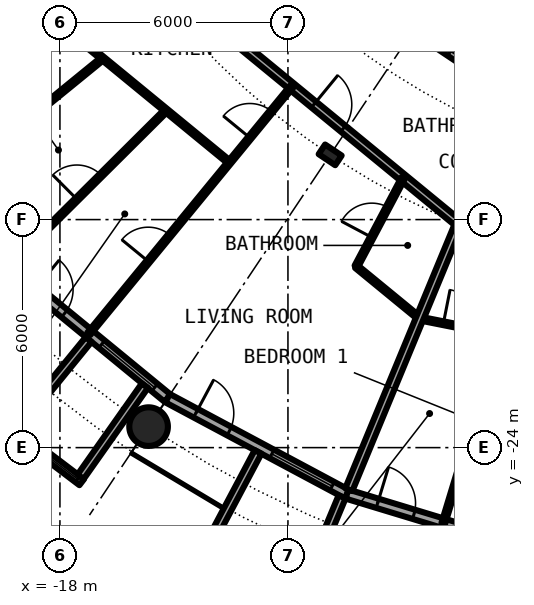
"""IFC4 building model, lengths in metres.
Left out: names, types, materials, properties, quantities, classifications, styles, units other than length and angle.
Written with IfcOpenShell. Run it as: python <this file> out.ifc"""

import sys

from ifc_helpers import new_model, si_unit, direction, frame, frame_2d, origin, origin_2d, place, context, subcontext, project, spatial, rectangle, circle, hollow_circle, i_section, extrude, element, fill, save


model = new_model("IFC4")
c1 = context("Model", 3, precision=1e-05, world=origin(), true_north=direction((0.0, 1.0)))
c2 = subcontext(c1, "Body", "Model", "MODEL_VIEW")
j1 = project(units=[si_unit("LENGTHUNIT", "METRE"), si_unit("PLANEANGLEUNIT", "RADIAN")], contexts=[c1])
p1 = place(None, origin())
s1 = spatial("IfcSite", under=j1, at=p1, CompositionType="ELEMENT")
p2 = place(p1, origin())
s2 = spatial("IfcBuilding", under=s1, at=p2, CompositionType="ELEMENT")
p3 = place(p2, frame((0.0, 0.0, 88.0)))
s3 = spatial("IfcBuildingStorey", under=s2, at=p3, CompositionType="ELEMENT", Elevation=88.0)
p4 = place(p3, frame((-15.667, -23.448, 0.0), z_axis=(0.0, 0.0, 1.0), x_axis=(1.0, 0.0, 0.0)))
e1 = element("IfcColumn", 1, at=p4, inside=s3, PredefinedType="COLUMN", context=c2, shape_type="SweptSolid", body=[
    extrude(hollow_circle(Radius=0.508, WallThickness=0.04, at=origin_2d()), origin(), (0.0, 0.0, 1.0), 3.05),
])
p5 = place(p3, frame((-10.889, -16.297, 0.0), z_axis=(0.0, 0.0, 1.0), x_axis=(-0.55557023302, -0.831469612303, 0.0)))
e2 = element("IfcColumn", 2, at=p5, inside=s3, PredefinedType="COLUMN", context=c2, shape_type="SweptSolid", body=[
    extrude(i_section(OverallWidth=0.306, OverallDepth=0.524, WebThickness=0.021, FlangeThickness=0.04, FilletRadius=0.027, at=origin_2d()), origin(), (0.0, 0.0, 1.0), 3.05),
])
p6 = place(p3, frame((-19.304, -19.304, 0.0), z_axis=(0.0, 0.0, 1.0), x_axis=(0.773019449054, -0.634382322723, 0.0)))
e3 = element("IfcWall", 3, at=p6, inside=s3, PredefinedType="SOLIDWALL", context=c2, shape_type="SweptSolid", body=[
    extrude(rectangle(XDim=5.352, YDim=0.25, at=frame_2d((2.676, 0.0))), origin(), (0.0, 0.0, 1.0), 2.7),
])
p7 = place(p6, frame((0.841, 0.0, 0.0)))
e4 = element("IfcOpeningElement", 4, at=p7, cuts=e3, PredefinedType="OPENING", context=c2, shape_type="SweptSolid", body=[
    extrude(rectangle(XDim=1.0, YDim=2.2, at=frame_2d((0.5, 1.1))), frame((0.0, 0.135, 0.0), z_axis=(0.0, -1.0, 0.0), x_axis=(1.0, 0.0, 0.0)), (0.0, 0.0, 1.0), 0.27),
])
p8 = place(p6, frame((3.111, 0.0, 0.3)))
e5 = element("IfcOpeningElement", 5, at=p8, cuts=e3, PredefinedType="OPENING", context=c2, shape_type="SweptSolid", body=[
    extrude(rectangle(XDim=1.8, YDim=2.1, at=frame_2d((0.9, 1.05))), frame((0.0, 0.135, 0.0), z_axis=(0.0, -1.0, 0.0), x_axis=(1.0, 0.0, 0.0)), (0.0, 0.0, 1.0), 0.27),
])
p9 = place(p3, frame((-19.289, -23.497, -0.03), z_axis=(0.0, 0.0, 1.0), x_axis=(0.796842165306, -0.60418752353, 0.0)))
e6 = element("IfcWall", 6, at=p9, inside=s3, PredefinedType="SOLIDWALL", context=c2, shape_type="SweptSolid", body=[
    extrude(rectangle(XDim=2.337, YDim=0.2, at=frame_2d((1.168, 0.0))), origin(), (0.0, 0.0, 1.0), 2.73),
])
p10 = place(p9, frame((0.128, 0.0, 0.33)))
e7 = element("IfcOpeningElement", 7, at=p10, cuts=e6, PredefinedType="OPENING", context=c2, shape_type="SweptSolid", body=[
    extrude(circle(Radius=1.04, at=frame_2d((1.04, 1.04))), frame((0.0, 0.11, 0.0), z_axis=(0.0, -1.0, 0.0), x_axis=(1.0, 0.0, 0.0)), (0.0, 0.0, 1.0), 0.22),
])
p11 = place(p3, frame((-17.246, -21.155, -0.03), z_axis=(0.0, 0.0, 1.0), x_axis=(-0.631741648902, -0.775179004516, 0.0)))
e8 = element("IfcWall", 8, at=p11, inside=s3, PredefinedType="SOLIDWALL", context=c2, shape_type="SweptSolid", body=[
    extrude(rectangle(XDim=3.006, YDim=0.2, at=frame_2d((1.503, 0.0))), origin(), (0.0, 0.0, 1.0), 2.73),
])
p12 = place(p3, frame((-15.765, -22.37, -0.03), z_axis=(0.0, 0.0, 1.0), x_axis=(-0.576274612209, -0.817256123454, 0.0)))
e9 = element("IfcWall", 9, at=p12, inside=s3, PredefinedType="SOLIDWALL", context=c2, shape_type="SweptSolid", body=[
    extrude(rectangle(XDim=2.933, YDim=0.2, at=frame_2d((1.466, 0.0))), origin(), (0.0, 0.0, 1.0), 2.73),
])
p13 = place(p3, frame((-15.167, -22.699, 0.0), z_axis=(0.0, 0.0, 1.0), x_axis=(0.881915646801, -0.471407246368, 0.0)))
e10 = element("IfcWall", 10, at=p13, inside=s3, PredefinedType="SOLIDWALL", context=c2, shape_type="SweptSolid", body=[
    extrude(rectangle(XDim=5.352, YDim=0.25, at=frame_2d((2.676, 0.0))), origin(), (0.0, 0.0, 1.0), 2.7),
])
p14 = place(p13, frame((0.841, 0.0, 0.0)))
e11 = element("IfcOpeningElement", 11, at=p14, cuts=e10, PredefinedType="OPENING", context=c2, shape_type="SweptSolid", body=[
    extrude(rectangle(XDim=1.0, YDim=2.2, at=frame_2d((0.5, 1.1))), frame((0.0, 0.135, 0.0), z_axis=(0.0, -1.0, 0.0), x_axis=(1.0, 0.0, 0.0)), (0.0, 0.0, 1.0), 0.27),
])
p15 = place(p13, frame((3.111, 0.0, 0.3)))
e12 = element("IfcOpeningElement", 12, at=p15, cuts=e10, PredefinedType="OPENING", context=c2, shape_type="SweptSolid", body=[
    extrude(rectangle(XDim=1.8, YDim=2.1, at=frame_2d((0.9, 1.05))), frame((0.0, 0.135, 0.0), z_axis=(0.0, -1.0, 0.0), x_axis=(1.0, 0.0, 0.0)), (0.0, 0.0, 1.0), 0.27),
])
p16 = place(p3, frame((-12.787, -24.113, -0.03), z_axis=(0.0, 0.0, 1.0), x_axis=(-0.468365282436, -0.883534924159, 0.0)))
e13 = element("IfcWall", 13, at=p16, inside=s3, PredefinedType="SOLIDWALL", context=c2, shape_type="SweptSolid", body=[
    extrude(rectangle(XDim=3.006, YDim=0.2, at=frame_2d((1.503, 0.0))), origin(), (0.0, 0.0, 1.0), 2.73),
])
p17 = place(p3, frame((-10.575, -25.295, -0.03), z_axis=(0.0, 0.0, 1.0), x_axis=(-0.385697364644, -0.922625353492, 0.0)))
e14 = element("IfcWall", 14, at=p17, inside=s3, PredefinedType="SOLIDWALL", context=c2, shape_type="SweptSolid", body=[
    extrude(rectangle(XDim=2.883, YDim=0.2, at=frame_2d((1.442, 0.0))), origin(), (0.0, 0.0, 1.0), 2.73),
])
p18 = place(p3, frame((-10.447, -25.222, 0.0), z_axis=(0.0, 0.0, 1.0), x_axis=(0.956965678721, -0.290201119486, 0.0)))
e15 = element("IfcWall", 15, at=p18, inside=s3, PredefinedType="SOLIDWALL", context=c2, shape_type="SweptSolid", body=[
    extrude(rectangle(XDim=5.351, YDim=0.25, at=frame_2d((2.676, 0.0))), origin(), (0.0, 0.0, 1.0), 2.7),
])
p19 = place(p18, frame((0.841, 0.0, 0.0)))
e16 = element("IfcOpeningElement", 16, at=p19, cuts=e15, PredefinedType="OPENING", context=c2, shape_type="SweptSolid", body=[
    extrude(rectangle(XDim=1.0, YDim=2.2, at=frame_2d((0.5, 1.1))), frame((0.0, 0.135, 0.0), z_axis=(0.0, -1.0, 0.0), x_axis=(1.0, 0.0, 0.0)), (0.0, 0.0, 1.0), 0.27),
])
p20 = place(p18, frame((3.111, 0.0, 0.3)))
e17 = element("IfcOpeningElement", 17, at=p20, cuts=e15, PredefinedType="OPENING", context=c2, shape_type="SweptSolid", body=[
    extrude(rectangle(XDim=1.8, YDim=2.1, at=frame_2d((0.9, 1.05))), frame((0.0, 0.135, 0.0), z_axis=(0.0, -1.0, 0.0), x_axis=(1.0, 0.0, 0.0)), (0.0, 0.0, 1.0), 0.27),
])
p21 = place(p3, frame((-8.536, -20.603, 0.0), z_axis=(0.0, 0.0, 1.0), x_axis=(0.980795826794, -0.195037294239, 0.0)))
e18 = element("IfcWall", 18, at=p21, inside=s3, PredefinedType="PARTITIONING", context=c2, shape_type="SweptSolid", body=[
    extrude(rectangle(XDim=4.352, YDim=0.1, at=frame_2d((2.176, 0.0))), origin(), (0.0, 0.0, 1.0), 2.7),
])
p22 = place(p21, frame((0.639, 0.0, 0.0)))
e19 = element("IfcOpeningElement", 19, at=p22, cuts=e18, PredefinedType="OPENING", context=c2, shape_type="SweptSolid", body=[
    extrude(rectangle(XDim=0.9, YDim=2.3, at=frame_2d((0.45, 1.15))), frame((0.0, 0.06, 0.0), z_axis=(0.0, -1.0, 0.0), x_axis=(1.0, 0.0, 0.0)), (0.0, 0.0, 1.0), 0.12),
])
p23 = place(p3, frame((-18.542, -12.389, 0.0), z_axis=(0.0, 0.0, 1.0), x_axis=(0.77296666644, -0.634446634929, 0.0)))
e20 = element("IfcWall", 20, at=p23, inside=s3, PredefinedType="PARTITIONING", context=c2, shape_type="SweptSolid", body=[
    extrude(rectangle(XDim=6.474, YDim=0.1, at=frame_2d((3.237, 0.0))), origin(), (0.0, 0.0, 1.0), 2.7),
])
p24 = place(p3, frame((-10.202, -19.234, 0.0), z_axis=(0.0, 0.0, 1.0), x_axis=(0.772948171844, -0.634469166818, 0.0)))
e21 = element("IfcWall", 21, at=p24, inside=s3, PredefinedType="PARTITIONING", context=c2, shape_type="SweptSolid", body=[
    extrude(rectangle(XDim=2.158, YDim=0.1, at=frame_2d((1.079, 0.0))), origin(), (0.0, 0.0, 1.0), 2.7),
])
p25 = place(p3, frame((-16.173, -10.991, 0.0), z_axis=(0.0, 0.0, 1.0), x_axis=(0.773013989296, -0.634388975591, 0.0)))
e22 = element("IfcWall", 22, at=p25, inside=s3, PredefinedType="PARTITIONING", context=c2, shape_type="SweptSolid", body=[
    extrude(rectangle(XDim=11.219, YDim=0.2, at=frame_2d((5.609, 0.0))), origin(), (0.0, 0.0, 1.0), 2.38),
])
p26 = place(p25, frame((6.278, 0.0, 0.0)))
e23 = element("IfcOpeningElement", 23, at=p26, cuts=e22, PredefinedType="OPENING", context=c2, shape_type="SweptSolid", body=[
    extrude(rectangle(XDim=1.0, YDim=2.3, at=frame_2d((0.5, 1.15))), frame((0.0, 0.11, 0.0), z_axis=(0.0, -1.0, 0.0), x_axis=(1.0, 0.0, 0.0)), (0.0, 0.0, 1.0), 0.22),
])
p27 = place(p3, frame((-12.706, -10.291, 0.0), z_axis=(0.0, 0.0, 1.0), x_axis=(0.831588572532, -0.555392155178, 0.0)))
e24 = element("IfcWall", 24, at=p27, inside=s3, PredefinedType="PARTITIONING", context=c2, shape_type="SweptSolid", body=[
    extrude(rectangle(XDim=11.314, YDim=0.2, at=frame_2d((5.657, 0.0))), origin(), (0.0, 0.0, 1.0), 2.7),
])
p28 = place(p27, frame((5.966, 0.0, 0.0)))
e25 = element("IfcOpeningElement", 25, at=p28, cuts=e24, PredefinedType="OPENING", context=c2, shape_type="SweptSolid", body=[
    extrude(rectangle(XDim=1.0, YDim=2.3, at=frame_2d((0.5, 1.15))), frame((0.0, 0.11, 0.0), z_axis=(0.0, -1.0, 0.0), x_axis=(1.0, 0.0, 0.0)), (0.0, 0.0, 1.0), 0.22),
])
p29 = place(p3, frame((-22.595, -15.097, 0.0), z_axis=(0.0, 0.0, 1.0), x_axis=(0.831505405283, 0.555516661303, 0.0)))
e26 = element("IfcWall", 26, at=p29, inside=s3, PredefinedType="PARTITIONING", context=c2, shape_type="SweptSolid", body=[
    extrude(rectangle(XDim=7.312, YDim=0.2, at=frame_2d((3.656, 0.0))), origin(), (0.0, 0.0, 1.0), 2.7),
])
p30 = place(p3, frame((-21.061, -17.173, 0.0), z_axis=(0.0, 0.0, 1.0), x_axis=(0.774926754572, 0.632051046236, 0.0)))
e27 = element("IfcWall", 27, at=p30, inside=s3, PredefinedType="PARTITIONING", context=c2, shape_type="SweptSolid", body=[
    extrude(rectangle(XDim=5.403, YDim=0.1, at=frame_2d((2.702, 0.0))), origin(), (0.0, 0.0, 1.0), 2.7),
])
p31 = place(p30, frame((2.252, 0.0, 0.0)))
e28 = element("IfcOpeningElement", 28, at=p31, cuts=e27, PredefinedType="OPENING", context=c2, shape_type="SweptSolid", body=[
    extrude(rectangle(XDim=0.9, YDim=2.3, at=frame_2d((0.45, 1.15))), frame((0.0, 0.06, 0.0), z_axis=(0.0, -1.0, 0.0), x_axis=(1.0, 0.0, 0.0)), (0.0, 0.0, 1.0), 0.12),
])
p32 = place(p3, frame((-19.265, -19.166, 0.0), z_axis=(0.0, 0.0, 1.0), x_axis=(0.708831450128, 0.705377895393, 0.0)))
e29 = element("IfcWall", 29, at=p32, inside=s3, PredefinedType="PARTITIONING", context=c2, shape_type="SweptSolid", body=[
    extrude(rectangle(XDim=5.726, YDim=0.1, at=frame_2d((2.863, 0.0))), origin(), (0.0, 0.0, 1.0), 2.7),
])
p33 = place(p32, frame((2.413, 0.0, 0.0)))
e30 = element("IfcOpeningElement", 30, at=p33, cuts=e29, PredefinedType="OPENING", context=c2, shape_type="SweptSolid", body=[
    extrude(rectangle(XDim=0.9, YDim=2.3, at=frame_2d((0.45, 1.15))), frame((0.0, 0.06, 0.0), z_axis=(0.0, -1.0, 0.0), x_axis=(1.0, 0.0, 0.0)), (0.0, 0.0, 1.0), 0.12),
])
p34 = place(p3, frame((-17.241, -21.006, 0.0), z_axis=(0.0, 0.0, 1.0), x_axis=(0.634522338131, 0.772904523478, 0.0)))
e31 = element("IfcWall", 31, at=p34, inside=s3, PredefinedType="PARTITIONING", context=c2, shape_type="SweptSolid", body=[
    extrude(rectangle(XDim=8.419, YDim=0.1, at=frame_2d((4.209, 0.0))), origin(), (0.0, 0.0, 1.0), 2.7),
])
p35 = place(p34, frame((6.677, 0.0, 0.0)))
e32 = element("IfcOpeningElement", 32, at=p35, cuts=e31, PredefinedType="OPENING", context=c2, shape_type="SweptSolid", body=[
    extrude(rectangle(XDim=0.9, YDim=2.3, at=frame_2d((0.45, 1.15))), frame((0.0, 0.06, 0.0), z_axis=(0.0, -1.0, 0.0), x_axis=(1.0, 0.0, 0.0)), (0.0, 0.0, 1.0), 0.12),
])
p36 = place(p34, frame((2.466, 0.0, 0.0)))
e33 = element("IfcOpeningElement", 33, at=p36, cuts=e31, PredefinedType="OPENING", context=c2, shape_type="SweptSolid", body=[
    extrude(rectangle(XDim=0.9, YDim=2.3, at=frame_2d((0.45, 1.15))), frame((0.0, 0.06, 0.0), z_axis=(0.0, -1.0, 0.0), x_axis=(1.0, 0.0, 0.0)), (0.0, 0.0, 1.0), 0.12),
])
p37 = place(p3, frame((-10.399, -25.106, 0.0), z_axis=(0.0, 0.0, 1.0), x_axis=(0.382600411313, 0.923913916587, 0.0)))
e34 = element("IfcWall", 34, at=p37, inside=s3, PredefinedType="PARTITIONING", context=c2, shape_type="SweptSolid", body=[
    extrude(rectangle(XDim=7.574, YDim=0.2, at=frame_2d((3.787, 0.0))), origin(), (0.0, 0.0, 1.0), 2.7),
])
p38 = place(p3, frame((-10.202, -19.234, 0.0), z_axis=(0.0, 0.0, 1.0), x_axis=(0.468462103808, 0.883483591979, 0.0)))
e35 = element("IfcWall", 35, at=p38, inside=s3, PredefinedType="PARTITIONING", context=c2, shape_type="SweptSolid", body=[
    extrude(rectangle(XDim=2.636, YDim=0.1, at=frame_2d((1.318, 0.0))), origin(), (0.0, 0.0, 1.0), 2.7),
])
p39 = place(p38, frame((0.868, 0.0, 0.0)))
e36 = element("IfcOpeningElement", 36, at=p39, cuts=e35, PredefinedType="OPENING", context=c2, shape_type="SweptSolid", body=[
    extrude(rectangle(XDim=0.9, YDim=2.3, at=frame_2d((0.45, 1.15))), frame((0.0, 0.06, 0.0), z_axis=(0.0, -1.0, 0.0), x_axis=(1.0, 0.0, 0.0)), (0.0, 0.0, 1.0), 0.12),
])
p40 = place(p3, frame((-7.913, -25.997, 0.0), z_axis=(0.0, 0.0, 1.0), x_axis=(0.291264462755, 0.956642573136, 0.0)))
e37 = element("IfcWall", 37, at=p40, inside=s3, PredefinedType="PARTITIONING", context=c2, shape_type="SweptSolid", body=[
    extrude(rectangle(XDim=5.195, YDim=0.1, at=frame_2d((2.598, 0.0))), origin(), (0.0, 0.0, 1.0), 2.7),
])
p41 = place(p7, origin())
e38 = element("IfcDoor", 38, at=p41, inside=s3, OperationType="SINGLE_SWING_LEFT", PredefinedType="DOOR", context=c2, shape_type="SweptSolid", body=[
    extrude(rectangle(XDim=1.0, YDim=2.2, at=frame_2d((0.5, 1.1))), frame((0.0, 0.025, 0.0), z_axis=(0.0, -1.0, 0.0), x_axis=(1.0, 0.0, 0.0)), (0.0, 0.0, 1.0), 0.05),
])
fill(e4, e38)
p42 = place(p8, origin())
e39 = element("IfcWindow", 39, at=p42, inside=s3, PartitioningType="SINGLE_PANEL", PredefinedType="WINDOW", context=c2, shape_type="SweptSolid", body=[
    extrude(rectangle(XDim=1.8, YDim=2.1, at=frame_2d((0.9, 1.05))), frame((0.0, 0.03, 0.0), z_axis=(0.0, -1.0, 0.0), x_axis=(1.0, 0.0, 0.0)), (0.0, 0.0, 1.0), 0.06),
])
fill(e5, e39)
p43 = place(p10, origin())
e40 = element("IfcWindow", 40, at=p43, inside=s3, PartitioningType="SINGLE_PANEL", PredefinedType="WINDOW", context=c2, shape_type="SweptSolid", body=[
    extrude(circle(Radius=1.04, at=frame_2d((1.04, 1.04))), frame((0.0, 0.03, 0.0), z_axis=(0.0, -1.0, 0.0), x_axis=(1.0, 0.0, 0.0)), (0.0, 0.0, 1.0), 0.06),
])
fill(e7, e40)
p44 = place(p14, origin())
e41 = element("IfcDoor", 41, at=p44, inside=s3, OperationType="SINGLE_SWING_LEFT", PredefinedType="DOOR", context=c2, shape_type="SweptSolid", body=[
    extrude(rectangle(XDim=1.0, YDim=2.2, at=frame_2d((0.5, 1.1))), frame((0.0, 0.025, 0.0), z_axis=(0.0, -1.0, 0.0), x_axis=(1.0, 0.0, 0.0)), (0.0, 0.0, 1.0), 0.05),
])
fill(e11, e41)
p45 = place(p15, origin())
e42 = element("IfcWindow", 42, at=p45, inside=s3, PartitioningType="SINGLE_PANEL", PredefinedType="WINDOW", context=c2, shape_type="SweptSolid", body=[
    extrude(rectangle(XDim=1.8, YDim=2.1, at=frame_2d((0.9, 1.05))), frame((0.0, 0.03, 0.0), z_axis=(0.0, -1.0, 0.0), x_axis=(1.0, 0.0, 0.0)), (0.0, 0.0, 1.0), 0.06),
])
fill(e12, e42)
p46 = place(p19, origin())
e43 = element("IfcDoor", 43, at=p46, inside=s3, OperationType="SINGLE_SWING_LEFT", PredefinedType="DOOR", context=c2, shape_type="SweptSolid", body=[
    extrude(rectangle(XDim=1.0, YDim=2.2, at=frame_2d((0.5, 1.1))), frame((0.0, 0.025, 0.0), z_axis=(0.0, -1.0, 0.0), x_axis=(1.0, 0.0, 0.0)), (0.0, 0.0, 1.0), 0.05),
])
fill(e16, e43)
p47 = place(p26, origin())
e44 = element("IfcDoor", 44, at=p47, inside=s3, OperationType="SINGLE_SWING_RIGHT", PredefinedType="DOOR", context=c2, shape_type="SweptSolid", body=[
    extrude(rectangle(XDim=1.0, YDim=2.3, at=frame_2d((0.5, 1.15))), frame((0.0, 0.025, 0.0), z_axis=(0.0, -1.0, 0.0), x_axis=(1.0, 0.0, 0.0)), (0.0, 0.0, 1.0), 0.05),
])
fill(e23, e44)
p48 = place(p39, origin())
e45 = element("IfcDoor", 45, at=p48, inside=s3, OperationType="SINGLE_SWING_RIGHT", PredefinedType="DOOR", context=c2, shape_type="SweptSolid", body=[
    extrude(rectangle(XDim=0.9, YDim=2.3, at=frame_2d((0.45, 1.15))), frame((0.0, 0.025, 0.0), z_axis=(0.0, -1.0, 0.0), x_axis=(1.0, 0.0, 0.0)), (0.0, 0.0, 1.0), 0.05),
])
fill(e36, e45)
p49 = place(p35, origin())
e46 = element("IfcDoor", 46, at=p49, inside=s3, OperationType="SINGLE_SWING_RIGHT", PredefinedType="DOOR", context=c2, shape_type="SweptSolid", body=[
    extrude(rectangle(XDim=0.9, YDim=2.3, at=frame_2d((0.45, 1.15))), frame((0.0, 0.025, 0.0), z_axis=(0.0, -1.0, 0.0), x_axis=(1.0, 0.0, 0.0)), (0.0, 0.0, 1.0), 0.05),
])
fill(e32, e46)
p50 = place(p36, origin())
e47 = element("IfcDoor", 47, at=p50, inside=s3, OperationType="SINGLE_SWING_LEFT", PredefinedType="DOOR", context=c2, shape_type="SweptSolid", body=[
    extrude(rectangle(XDim=0.9, YDim=2.3, at=frame_2d((0.45, 1.15))), frame((0.0, 0.025, 0.0), z_axis=(0.0, -1.0, 0.0), x_axis=(1.0, 0.0, 0.0)), (0.0, 0.0, 1.0), 0.05),
])
fill(e33, e47)
p51 = place(p33, origin())
e48 = element("IfcDoor", 48, at=p51, inside=s3, OperationType="SINGLE_SWING_LEFT", PredefinedType="DOOR", context=c2, shape_type="SweptSolid", body=[
    extrude(rectangle(XDim=0.9, YDim=2.3, at=frame_2d((0.45, 1.15))), frame((0.0, 0.025, 0.0), z_axis=(0.0, -1.0, 0.0), x_axis=(1.0, 0.0, 0.0)), (0.0, 0.0, 1.0), 0.05),
])
fill(e30, e48)
p52 = place(p22, origin())
e49 = element("IfcDoor", 49, at=p52, inside=s3, OperationType="SINGLE_SWING_LEFT", PredefinedType="DOOR", context=c2, shape_type="SweptSolid", body=[
    extrude(rectangle(XDim=0.9, YDim=2.3, at=frame_2d((0.45, 1.15))), frame((0.0, 0.025, 0.0), z_axis=(0.0, -1.0, 0.0), x_axis=(1.0, 0.0, 0.0)), (0.0, 0.0, 1.0), 0.05),
])
fill(e19, e49)
p53 = place(p28, origin())
e50 = element("IfcDoor", 50, at=p53, inside=s3, OperationType="SINGLE_SWING_RIGHT", PredefinedType="DOOR", context=c2, shape_type="SweptSolid", body=[
    extrude(rectangle(XDim=1.0, YDim=2.3, at=frame_2d((0.5, 1.15))), frame((0.0, 0.025, 0.0), z_axis=(0.0, -1.0, 0.0), x_axis=(1.0, 0.0, 0.0)), (0.0, 0.0, 1.0), 0.05),
])
fill(e25, e50)
save(model, sys.argv[1])
